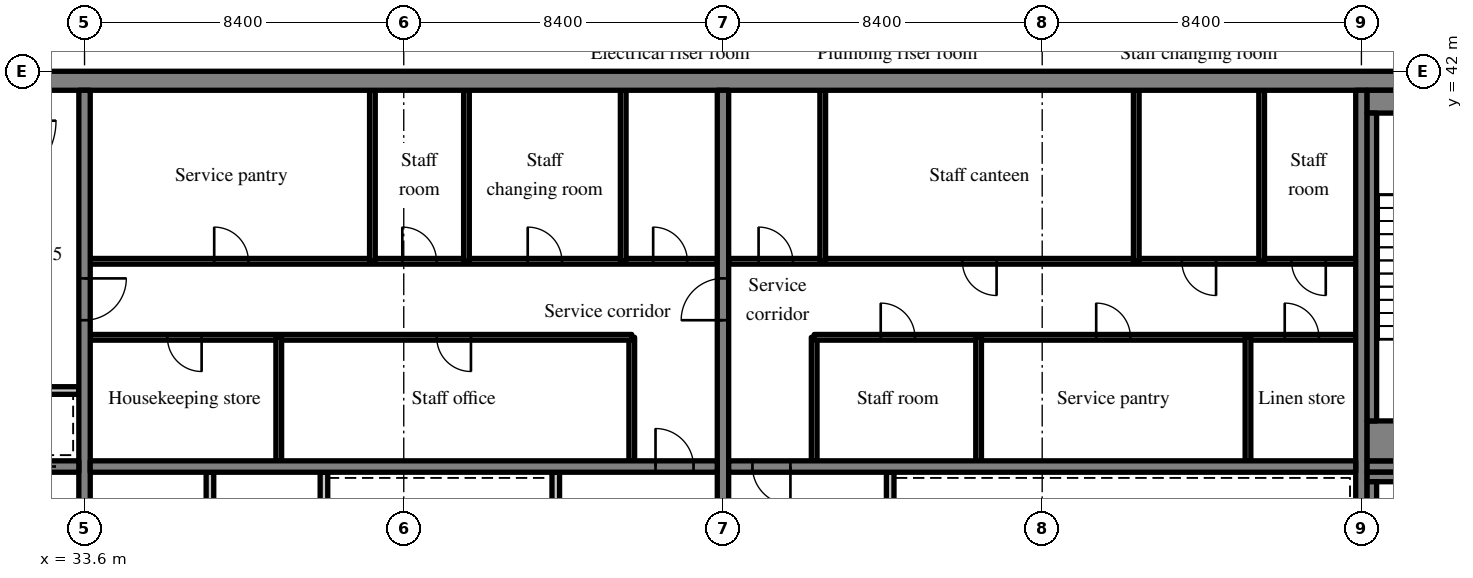
"""IFC4 building model, lengths in metres.
Left out: names, types, materials, properties, quantities, classifications, styles, units other than length and angle.
Written with IfcOpenShell. Run it as: python <this file> out.ifc"""

import sys

from ifc_helpers import new_model, si_unit, direction, frame, frame_2d, origin, place, context, subcontext, project, spatial, rectangle, extrude, source, transform, mapped, element, fill, save


model = new_model("IFC4")
c1 = context("Model", 3, precision=1e-05, world=origin(), true_north=direction((0.0, 1.0)))
c2 = subcontext(c1, "Body", "Model", "MODEL_VIEW")
j1 = project(units=[si_unit("LENGTHUNIT", "METRE"), si_unit("PLANEANGLEUNIT", "RADIAN")], contexts=[c1])
p1 = place(None, origin())
s1 = spatial("IfcSite", under=j1, at=p1, CompositionType="ELEMENT")
p2 = place(p1, origin())
s2 = spatial("IfcBuilding", under=s1, at=p2, CompositionType="ELEMENT")
p3 = place(p2, frame((0.0, 0.0, 293.7)))
s3 = spatial("IfcBuildingStorey", under=s2, at=p3, CompositionType="ELEMENT", Elevation=293.7)
m1 = source(origin(), c2, "Body", "SweptSolid", [
    extrude(rectangle(XDim=50.4, YDim=0.5, at=frame_2d((25.2, 0.0))), origin(), (0.0, 0.0, 1.0), 3.72),
])
p4 = place(p3, frame((25.2, 41.75, 0.0), z_axis=(0.0, 0.0, 1.0), x_axis=(1.0, 0.0, 0.0)))
e1 = element("IfcWall", 1, at=p4, inside=s3, PredefinedType="SHEAR", context=c2, shape_type="MappedRepresentation", body=[
    mapped(m1, transform((0.0, 0.0, 0.0), scale=1.0)),
])
m2 = source(origin(), c2, "Body", "SweptSolid", [
    extrude(rectangle(XDim=19.0, YDim=0.3, at=frame_2d((9.5, 0.0))), origin(), (0.0, 0.0, 1.0), 3.72),
])
p5 = place(p3, frame((33.6, 22.5, 0.0), z_axis=(0.0, 0.0, 1.0), x_axis=(0.0, 1.0, 0.0)))
e2 = element("IfcWall", 2, at=p5, inside=s3, PredefinedType="SHEAR", context=c2, shape_type="MappedRepresentation", body=[
    mapped(m2, transform((0.0, 0.0, 0.0), scale=1.0)),
])
m3 = source(origin(), c2, "Body", "SweptSolid", [
    extrude(rectangle(XDim=1.1, YDim=2.1, at=frame_2d((0.55, 1.05))), frame((0.0, 0.16, 0.0), z_axis=(0.0, -1.0, 0.0), x_axis=(1.0, 0.0, 0.0)), (0.0, 0.0, 1.0), 0.32),
])
p6 = place(p5, frame((12.95, 0.0, 0.0)))
e3 = element("IfcOpeningElement", 3, at=p6, cuts=e2, PredefinedType="OPENING", context=c2, shape_type="MappedRepresentation", body=[
    mapped(m3, transform((0.0, 0.0, 0.0), scale=1.0)),
])
p7 = place(p3, frame((50.4, 22.5, 0.0), z_axis=(0.0, 0.0, 1.0), x_axis=(0.0, 1.0, 0.0)))
e4 = element("IfcWall", 4, at=p7, inside=s3, PredefinedType="SHEAR", context=c2, shape_type="MappedRepresentation", body=[
    mapped(m2, transform((0.0, 0.0, 0.0), scale=1.0)),
])
p8 = place(p7, frame((12.95, 0.0, 0.0)))
e5 = element("IfcOpeningElement", 5, at=p8, cuts=e4, PredefinedType="OPENING", context=c2, shape_type="MappedRepresentation", body=[
    mapped(m3, transform((0.0, 0.0, 0.0), scale=1.0)),
])
p9 = place(p3, frame((67.2, 22.5, 0.0), z_axis=(0.0, 0.0, 1.0), x_axis=(0.0, 1.0, 0.0)))
e6 = element("IfcWall", 6, at=p9, inside=s3, PredefinedType="SHEAR", context=c2, shape_type="MappedRepresentation", body=[
    mapped(m2, transform((0.0, 0.0, 0.0), scale=1.0)),
])
m4 = source(origin(), c2, "Body", "SweptSolid", [
    extrude(rectangle(XDim=7.75, YDim=0.3, at=frame_2d((3.875, 0.0))), origin(), (0.0, 0.0, 1.0), 3.72),
])
p10 = place(p3, frame((25.7, 31.6, 0.0), z_axis=(0.0, 0.0, 1.0), x_axis=(1.0, 0.0, 0.0)))
e7 = element("IfcWall", 7, at=p10, inside=s3, PredefinedType="SHEAR", context=c2, shape_type="MappedRepresentation", body=[
    mapped(m4, transform((0.0, 0.0, 0.0), scale=1.0)),
])
p11 = place(p10, frame((6.05, 0.0, 0.0)))
e8 = element("IfcOpeningElement", 8, at=p11, cuts=e7, PredefinedType="OPENING", context=c2, shape_type="MappedRepresentation", body=[
    mapped(m3, transform((0.0, 0.0, 0.0), scale=1.0)),
])
m5 = source(origin(), c2, "Body", "SweptSolid", [
    extrude(rectangle(XDim=16.5, YDim=0.3, at=frame_2d((8.25, 0.0))), origin(), (0.0, 0.0, 1.0), 3.72),
])
p12 = place(p3, frame((33.75, 31.6, 0.0), z_axis=(0.0, 0.0, 1.0), x_axis=(1.0, 0.0, 0.0)))
e9 = element("IfcWall", 9, at=p12, inside=s3, PredefinedType="SHEAR", context=c2, shape_type="MappedRepresentation", body=[
    mapped(m5, transform((0.0, 0.0, 0.0), scale=1.0)),
])
m6 = source(origin(), c2, "Body", "SweptSolid", [
    extrude(rectangle(XDim=1.0, YDim=2.1, at=frame_2d((0.5, 1.05))), frame((0.0, 0.16, 0.0), z_axis=(0.0, -1.0, 0.0), x_axis=(1.0, 0.0, 0.0)), (0.0, 0.0, 1.0), 0.32),
])
p13 = place(p12, frame((14.875, 0.0, 0.0)))
e10 = element("IfcOpeningElement", 10, at=p13, cuts=e9, PredefinedType="OPENING", context=c2, shape_type="MappedRepresentation", body=[
    mapped(m6, transform((0.0, 0.0, 0.0), scale=1.0)),
])
p14 = place(p3, frame((50.55, 31.6, 0.0), z_axis=(0.0, 0.0, 1.0), x_axis=(1.0, 0.0, 0.0)))
e11 = element("IfcWall", 11, at=p14, inside=s3, PredefinedType="SHEAR", context=c2, shape_type="MappedRepresentation", body=[
    mapped(m5, transform((0.0, 0.0, 0.0), scale=1.0)),
])
p15 = place(p14, frame((0.625, 0.0, 0.0)))
e12 = element("IfcOpeningElement", 12, at=p15, cuts=e11, PredefinedType="OPENING", context=c2, shape_type="MappedRepresentation", body=[
    mapped(m6, transform((0.0, 0.0, 0.0), scale=1.0)),
])
p16 = place(p3, frame((67.35, 31.6, 0.0), z_axis=(0.0, 0.0, 1.0), x_axis=(1.0, 0.0, 0.0)))
e13 = element("IfcWall", 13, at=p16, inside=s3, PredefinedType="SHEAR", context=c2, shape_type="MappedRepresentation", body=[
    mapped(m4, transform((0.0, 0.0, 0.0), scale=1.0)),
])
p17 = place(p16, frame((5.875, 0.0, 0.0)))
e14 = element("IfcOpeningElement", 14, at=p17, cuts=e13, PredefinedType="OPENING", context=c2, shape_type="MappedRepresentation", body=[
    mapped(m3, transform((0.0, 0.0, 0.0), scale=1.0)),
])
m7 = source(origin(), c2, "Body", "SweptSolid", [
    extrude(rectangle(XDim=8.95, YDim=0.2, at=frame_2d((4.475, 0.0))), origin(), (0.0, 0.0, 1.0), 3.72),
])
p18 = place(p3, frame((39.9, 22.5, 0.0), z_axis=(0.0, 0.0, 1.0), x_axis=(0.0, 1.0, 0.0)))
e15 = element("IfcWall", 15, at=p18, inside=s3, PredefinedType="PARTITIONING", context=c2, shape_type="MappedRepresentation", body=[
    mapped(m7, transform((0.0, 0.0, 0.0), scale=1.0)),
])
m8 = source(origin(), c2, "Body", "SweptSolid", [
    extrude(rectangle(XDim=0.9, YDim=2.1, at=frame_2d((0.45, 1.05))), frame((0.0, 0.11, 0.0), z_axis=(0.0, -1.0, 0.0), x_axis=(1.0, 0.0, 0.0)), (0.0, 0.0, 1.0), 0.22),
])
p19 = place(p18, frame((4.05, 0.0, 0.0)))
e16 = element("IfcOpeningElement", 16, at=p19, cuts=e15, PredefinedType="OPENING", context=c2, shape_type="MappedRepresentation", body=[
    mapped(m8, transform((0.0, 0.0, 0.0), scale=1.0)),
])
m9 = source(origin(), c2, "Body", "SweptSolid", [
    extrude(rectangle(XDim=2.65, YDim=0.2, at=frame_2d((1.325, 0.0))), origin(), (0.0, 0.0, 1.0), 3.72),
])
p20 = place(p3, frame((46.0, 28.8, 0.0), z_axis=(0.0, 0.0, 1.0), x_axis=(0.0, 1.0, 0.0)))
e17 = element("IfcWall", 17, at=p20, inside=s3, PredefinedType="SOLIDWALL", context=c2, shape_type="MappedRepresentation", body=[
    mapped(m9, transform((0.0, 0.0, 0.0), scale=1.0)),
])
p21 = place(p3, frame((36.9, 22.5, 0.0), z_axis=(0.0, 0.0, 1.0), x_axis=(0.0, 1.0, 0.0)))
e18 = element("IfcWall", 18, at=p21, inside=s3, PredefinedType="PARTITIONING", context=c2, shape_type="MappedRepresentation", body=[
    mapped(m7, transform((0.0, 0.0, 0.0), scale=1.0)),
])
m10 = source(origin(), c2, "Body", "SweptSolid", [
    extrude(rectangle(XDim=3.25, YDim=0.15, at=frame_2d((1.625, 0.0))), origin(), (0.0, 0.0, 1.0), 3.72),
])
p22 = place(p3, frame((48.0, 31.75, 0.0), z_axis=(0.0, 0.0, 1.0), x_axis=(0.0, 1.0, 0.0)))
e19 = element("IfcWall", 19, at=p22, inside=s3, PredefinedType="PARTITIONING", context=c2, shape_type="MappedRepresentation", body=[
    mapped(m10, transform((0.0, 0.0, 0.0), scale=1.0)),
])
m11 = source(origin(), c2, "Body", "SweptSolid", [
    extrude(rectangle(XDim=14.25, YDim=0.15, at=frame_2d((7.125, 0.0))), origin(), (0.0, 0.0, 1.0), 3.72),
])
p23 = place(p3, frame((33.75, 35.0, 0.0), z_axis=(0.0, 0.0, 1.0), x_axis=(1.0, 0.0, 0.0)))
e20 = element("IfcWall", 20, at=p23, inside=s3, PredefinedType="PARTITIONING", context=c2, shape_type="MappedRepresentation", body=[
    mapped(m11, transform((0.0, 0.0, 0.0), scale=1.0)),
])
m12 = source(origin(), c2, "Body", "SweptSolid", [
    extrude(rectangle(XDim=0.9, YDim=2.1, at=frame_2d((0.45, 1.05))), frame((0.0, 0.085, 0.0), z_axis=(0.0, -1.0, 0.0), x_axis=(1.0, 0.0, 0.0)), (0.0, 0.0, 1.0), 0.17),
])
p24 = place(p23, frame((2.031, 0.0, 0.0)))
e21 = element("IfcOpeningElement", 21, at=p24, cuts=e20, PredefinedType="OPENING", context=c2, shape_type="MappedRepresentation", body=[
    mapped(m12, transform((0.0, 0.0, 0.0), scale=1.0)),
])
p25 = place(p23, frame((9.118, 0.0, 0.0)))
e22 = element("IfcOpeningElement", 22, at=p25, cuts=e20, PredefinedType="OPENING", context=c2, shape_type="MappedRepresentation", body=[
    mapped(m12, transform((0.0, 0.0, 0.0), scale=1.0)),
])
m13 = source(origin(), c2, "Body", "SweptSolid", [
    extrude(rectangle(XDim=16.5, YDim=0.15, at=frame_2d((8.25, 0.0))), origin(), (0.0, 0.0, 1.0), 3.72),
])
p26 = place(p3, frame((33.75, 37.0, 0.0), z_axis=(0.0, 0.0, 1.0), x_axis=(1.0, 0.0, 0.0)))
e23 = element("IfcWall", 23, at=p26, inside=s3, PredefinedType="PARTITIONING", context=c2, shape_type="MappedRepresentation", body=[
    mapped(m13, transform((0.0, 0.0, 0.0), scale=1.0)),
])
p27 = place(p26, frame((3.262, 0.0, 0.0)))
e24 = element("IfcOpeningElement", 24, at=p27, cuts=e23, PredefinedType="OPENING", context=c2, shape_type="MappedRepresentation", body=[
    mapped(m12, transform((0.0, 0.0, 0.0), scale=1.0)),
])
p28 = place(p26, frame((8.212, 0.0, 0.0)))
e25 = element("IfcOpeningElement", 25, at=p28, cuts=e23, PredefinedType="OPENING", context=c2, shape_type="MappedRepresentation", body=[
    mapped(m12, transform((0.0, 0.0, 0.0), scale=1.0)),
])
p29 = place(p26, frame((11.512, 0.0, 0.0)))
e26 = element("IfcOpeningElement", 26, at=p29, cuts=e23, PredefinedType="OPENING", context=c2, shape_type="MappedRepresentation", body=[
    mapped(m12, transform((0.0, 0.0, 0.0), scale=1.0)),
])
p30 = place(p26, frame((14.813, 0.0, 0.0)))
e27 = element("IfcOpeningElement", 27, at=p30, cuts=e23, PredefinedType="OPENING", context=c2, shape_type="MappedRepresentation", body=[
    mapped(m12, transform((0.0, 0.0, 0.0), scale=1.0)),
])
p31 = place(p3, frame((38.711, 31.75, 0.0), z_axis=(0.0, 0.0, 1.0), x_axis=(0.0, 1.0, 0.0)))
e28 = element("IfcWall", 28, at=p31, inside=s3, PredefinedType="PARTITIONING", context=c2, shape_type="MappedRepresentation", body=[
    mapped(m10, transform((0.0, 0.0, 0.0), scale=1.0)),
])
m14 = source(origin(), c2, "Body", "SweptSolid", [
    extrude(rectangle(XDim=4.5, YDim=0.15, at=frame_2d((2.25, 0.0))), origin(), (0.0, 0.0, 1.0), 3.72),
])
for number, where, z_axis, x_axis in (
    (29, (41.175, 37.0, 0.0), (0.0, 0.0, 1.0), (0.0, 1.0, 0.0)),
    (30, (43.65, 37.0, 0.0), (0.0, 0.0, 1.0), (0.0, 1.0, 0.0)),
    (31, (47.775, 37.0, 0.0), (0.0, 0.0, 1.0), (0.0, 1.0, 0.0)),
):
    element("IfcWall", number, at=place(p3, frame(where, z_axis=z_axis, x_axis=x_axis)), inside=s3, PredefinedType="PARTITIONING", context=c2, shape_type="MappedRepresentation", body=[
        mapped(m14, transform((0.0, 0.0, 0.0), scale=1.0)),
    ])
p32 = place(p3, frame((54.8, 28.8, 0.0), z_axis=(0.0, 0.0, 1.0), x_axis=(0.0, 1.0, 0.0)))
e32 = element("IfcWall", 32, at=p32, inside=s3, PredefinedType="SOLIDWALL", context=c2, shape_type="MappedRepresentation", body=[
    mapped(m9, transform((0.0, 0.0, 0.0), scale=1.0)),
])
p33 = place(p3, frame((52.8, 31.75, 0.0), z_axis=(0.0, 0.0, 1.0), x_axis=(0.0, 1.0, 0.0)))
e33 = element("IfcWall", 33, at=p33, inside=s3, PredefinedType="PARTITIONING", context=c2, shape_type="MappedRepresentation", body=[
    mapped(m10, transform((0.0, 0.0, 0.0), scale=1.0)),
])
p34 = place(p3, frame((67.05, 35.0, 0.0), z_axis=(0.0, 0.0, 1.0), x_axis=(-1.0, 0.0, 0.0)))
e34 = element("IfcWall", 34, at=p34, inside=s3, PredefinedType="PARTITIONING", context=c2, shape_type="MappedRepresentation", body=[
    mapped(m11, transform((0.0, 0.0, 0.0), scale=1.0)),
])
p35 = place(p34, frame((0.968, 0.0, 0.0)))
e35 = element("IfcOpeningElement", 35, at=p35, cuts=e34, PredefinedType="OPENING", context=c2, shape_type="MappedRepresentation", body=[
    mapped(m12, transform((0.0, 0.0, 0.0), scale=1.0)),
])
p36 = place(p34, frame((5.929, 0.0, 0.0)))
e36 = element("IfcOpeningElement", 36, at=p36, cuts=e34, PredefinedType="OPENING", context=c2, shape_type="MappedRepresentation", body=[
    mapped(m12, transform((0.0, 0.0, 0.0), scale=1.0)),
])
p37 = place(p34, frame((11.599, 0.0, 0.0)))
e37 = element("IfcOpeningElement", 37, at=p37, cuts=e34, PredefinedType="OPENING", context=c2, shape_type="MappedRepresentation", body=[
    mapped(m12, transform((0.0, 0.0, 0.0), scale=1.0)),
])
p38 = place(p3, frame((67.05, 37.0, 0.0), z_axis=(0.0, 0.0, 1.0), x_axis=(-1.0, 0.0, 0.0)))
e38 = element("IfcWall", 38, at=p38, inside=s3, PredefinedType="PARTITIONING", context=c2, shape_type="MappedRepresentation", body=[
    mapped(m13, transform((0.0, 0.0, 0.0), scale=1.0)),
])
p39 = place(p38, frame((0.788, 0.0, 0.0)))
e39 = element("IfcOpeningElement", 39, at=p39, cuts=e38, PredefinedType="OPENING", context=c2, shape_type="MappedRepresentation", body=[
    mapped(m12, transform((0.0, 0.0, 0.0), scale=1.0)),
])
p40 = place(p38, frame((3.675, 0.0, 0.0)))
e40 = element("IfcOpeningElement", 40, at=p40, cuts=e38, PredefinedType="OPENING", context=c2, shape_type="MappedRepresentation", body=[
    mapped(m12, transform((0.0, 0.0, 0.0), scale=1.0)),
])
p41 = place(p38, frame((9.45, 0.0, 0.0)))
e41 = element("IfcOpeningElement", 41, at=p41, cuts=e38, PredefinedType="OPENING", context=c2, shape_type="MappedRepresentation", body=[
    mapped(m12, transform((0.0, 0.0, 0.0), scale=1.0)),
])
p42 = place(p38, frame((14.813, 0.0, 0.0)))
e42 = element("IfcOpeningElement", 42, at=p42, cuts=e38, PredefinedType="OPENING", context=c2, shape_type="MappedRepresentation", body=[
    mapped(m12, transform((0.0, 0.0, 0.0), scale=1.0)),
])
for number, where, z_axis, x_axis in (
    (43, (64.215, 31.75, 0.0), (0.0, 0.0, 1.0), (0.0, 1.0, 0.0)),
    (44, (57.127, 31.75, 0.0), (0.0, 0.0, 1.0), (0.0, 1.0, 0.0)),
):
    element("IfcWall", number, at=place(p3, frame(where, z_axis=z_axis, x_axis=x_axis)), inside=s3, PredefinedType="PARTITIONING", context=c2, shape_type="MappedRepresentation", body=[
        mapped(m10, transform((0.0, 0.0, 0.0), scale=1.0)),
    ])
for number, where, z_axis, x_axis in (
    (45, (64.575, 37.0, 0.0), (0.0, 0.0, 1.0), (0.0, 1.0, 0.0)),
    (46, (61.275, 37.0, 0.0), (0.0, 0.0, 1.0), (0.0, 1.0, 0.0)),
    (47, (53.025, 37.0, 0.0), (0.0, 0.0, 1.0), (0.0, 1.0, 0.0)),
):
    element("IfcWall", number, at=place(p3, frame(where, z_axis=z_axis, x_axis=x_axis)), inside=s3, PredefinedType="PARTITIONING", context=c2, shape_type="MappedRepresentation", body=[
        mapped(m14, transform((0.0, 0.0, 0.0), scale=1.0)),
    ])
m15 = source(origin(), c2, "Body", "SweptSolid", [
    extrude(rectangle(XDim=2.3, YDim=0.2, at=frame_2d((1.15, 0.0))), origin(), (0.0, 0.0, 1.0), 3.72),
])
p43 = place(p3, frame((31.15, 33.6, 0.0), z_axis=(0.0, 0.0, 1.0), x_axis=(1.0, 0.0, 0.0)))
e48 = element("IfcWall", 48, at=p43, inside=s3, PredefinedType="SOLIDWALL", context=c2, shape_type="MappedRepresentation", body=[
    mapped(m15, transform((0.0, 0.0, 0.0), scale=1.0)),
])
m16 = source(origin(), c2, "Body", "SweptSolid", [
    extrude(rectangle(XDim=4.9, YDim=0.25, at=frame_2d((2.45, 0.0))), origin(), (0.0, 0.0, 1.0), 3.72),
])
p44 = place(p3, frame((67.35, 31.325, 0.0), z_axis=(0.0, 0.0, 1.0), x_axis=(1.0, 0.0, 0.0)))
e49 = element("IfcWall", 49, at=p44, inside=s3, PredefinedType="SOLIDWALL", context=c2, shape_type="MappedRepresentation", body=[
    mapped(m16, transform((0.0, 0.0, 0.0), scale=1.0)),
])
m17 = source(origin(), c2, "Body", "SweptSolid", [
    extrude(rectangle(XDim=8.1, YDim=0.25, at=frame_2d((4.05, 0.0))), origin(), (0.0, 0.0, 1.0), 3.72),
])
p45 = place(p3, frame((67.475, 23.1, 0.0), z_axis=(0.0, 0.0, 1.0), x_axis=(0.0, 1.0, 0.0)))
e50 = element("IfcWall", 50, at=p45, inside=s3, PredefinedType="SOLIDWALL", context=c2, shape_type="MappedRepresentation", body=[
    mapped(m17, transform((0.0, 0.0, 0.0), scale=1.0)),
])
m18 = source(origin(), c2, "Body", "SweptSolid", [
    extrude(rectangle(XDim=4.9, YDim=0.6, at=frame_2d((2.45, 0.0))), origin(), (0.0, 0.0, 1.0), 3.72),
])
p46 = place(p3, frame((67.35, 41.2, 0.0), z_axis=(0.0, 0.0, 1.0), x_axis=(1.0, 0.0, 0.0)))
e51 = element("IfcWall", 51, at=p46, inside=s3, PredefinedType="SOLIDWALL", context=c2, shape_type="MappedRepresentation", body=[
    mapped(m18, transform((0.0, 0.0, 0.0), scale=1.0)),
])
m19 = source(origin(), c2, "Body", "SweptSolid", [
    extrude(rectangle(XDim=4.9, YDim=1.05, at=frame_2d((2.45, 0.0))), origin(), (0.0, 0.0, 1.0), 3.72),
])
p47 = place(p3, frame((67.35, 32.275, 0.0), z_axis=(0.0, 0.0, 1.0), x_axis=(1.0, 0.0, 0.0)))
e52 = element("IfcWall", 52, at=p47, inside=s3, PredefinedType="SOLIDWALL", context=c2, shape_type="MappedRepresentation", body=[
    mapped(m19, transform((0.0, 0.0, 0.0), scale=1.0)),
])
p48 = place(p3, frame((67.475, 32.8, 0.0), z_axis=(0.0, 0.0, 1.0), x_axis=(0.0, 1.0, 0.0)))
e53 = element("IfcWall", 53, at=p48, inside=s3, PredefinedType="SOLIDWALL", context=c2, shape_type="MappedRepresentation", body=[
    mapped(m17, transform((0.0, 0.0, 0.0), scale=1.0)),
])
m20 = source(origin(), c2, "Body", "SweptSolid", [
    extrude(rectangle(XDim=1.0, YDim=2.1, at=frame_2d((0.5, 1.05))), frame((0.0, 0.025, 0.0), z_axis=(0.0, -1.0, 0.0), x_axis=(1.0, 0.0, 0.0)), (0.0, 0.0, 1.0), 0.05),
])
p49 = place(p13, origin())
e54 = element("IfcDoor", 54, at=p49, inside=s3, OperationType="SINGLE_SWING_LEFT", PredefinedType="DOOR", context=c2, shape_type="MappedRepresentation", body=[
    mapped(m20, transform((0.0, 0.0, 0.0), scale=1.0)),
])
fill(e10, e54)
m21 = source(origin(), c2, "Body", "SweptSolid", [
    extrude(rectangle(XDim=0.9, YDim=2.1, at=frame_2d((0.45, 1.05))), frame((0.0, 0.025, 0.0), z_axis=(0.0, -1.0, 0.0), x_axis=(1.0, 0.0, 0.0)), (0.0, 0.0, 1.0), 0.05),
])
p50 = place(p24, origin())
e55 = element("IfcDoor", 55, at=p50, inside=s3, OperationType="SINGLE_SWING_RIGHT", PredefinedType="DOOR", context=c2, shape_type="MappedRepresentation", body=[
    mapped(m21, transform((0.0, 0.0, 0.0), scale=1.0)),
])
fill(e21, e55)
p51 = place(p25, origin())
e56 = element("IfcDoor", 56, at=p51, inside=s3, OperationType="SINGLE_SWING_RIGHT", PredefinedType="DOOR", context=c2, shape_type="MappedRepresentation", body=[
    mapped(m21, transform((0.0, 0.0, 0.0), scale=1.0)),
])
fill(e22, e56)
p52 = place(p27, origin())
e57 = element("IfcDoor", 57, at=p52, inside=s3, OperationType="SINGLE_SWING_LEFT", PredefinedType="DOOR", context=c2, shape_type="MappedRepresentation", body=[
    mapped(m21, transform((0.0, 0.0, 0.0), scale=1.0)),
])
fill(e24, e57)
p53 = place(p28, origin())
e58 = element("IfcDoor", 58, at=p53, inside=s3, OperationType="SINGLE_SWING_LEFT", PredefinedType="DOOR", context=c2, shape_type="MappedRepresentation", body=[
    mapped(m21, transform((0.0, 0.0, 0.0), scale=1.0)),
])
fill(e25, e58)
p54 = place(p29, origin())
e59 = element("IfcDoor", 59, at=p54, inside=s3, OperationType="SINGLE_SWING_LEFT", PredefinedType="DOOR", context=c2, shape_type="MappedRepresentation", body=[
    mapped(m21, transform((0.0, 0.0, 0.0), scale=1.0)),
])
fill(e26, e59)
p55 = place(p30, origin())
e60 = element("IfcDoor", 60, at=p55, inside=s3, OperationType="SINGLE_SWING_LEFT", PredefinedType="DOOR", context=c2, shape_type="MappedRepresentation", body=[
    mapped(m21, transform((0.0, 0.0, 0.0), scale=1.0)),
])
fill(e27, e60)
p56 = place(p15, origin())
e61 = element("IfcDoor", 61, at=p56, inside=s3, OperationType="SINGLE_SWING_RIGHT", PredefinedType="DOOR", context=c2, shape_type="MappedRepresentation", body=[
    mapped(m20, transform((0.0, 0.0, 0.0), scale=1.0)),
])
fill(e12, e61)
p57 = place(p35, origin())
e62 = element("IfcDoor", 62, at=p57, inside=s3, OperationType="SINGLE_SWING_RIGHT", PredefinedType="DOOR", context=c2, shape_type="MappedRepresentation", body=[
    mapped(m21, transform((0.0, 0.0, 0.0), scale=1.0)),
])
fill(e35, e62)
p58 = place(p36, origin())
e63 = element("IfcDoor", 63, at=p58, inside=s3, OperationType="SINGLE_SWING_RIGHT", PredefinedType="DOOR", context=c2, shape_type="MappedRepresentation", body=[
    mapped(m21, transform((0.0, 0.0, 0.0), scale=1.0)),
])
fill(e36, e63)
p59 = place(p37, origin())
e64 = element("IfcDoor", 64, at=p59, inside=s3, OperationType="SINGLE_SWING_RIGHT", PredefinedType="DOOR", context=c2, shape_type="MappedRepresentation", body=[
    mapped(m21, transform((0.0, 0.0, 0.0), scale=1.0)),
])
fill(e37, e64)
p60 = place(p39, origin())
e65 = element("IfcDoor", 65, at=p60, inside=s3, OperationType="SINGLE_SWING_LEFT", PredefinedType="DOOR", context=c2, shape_type="MappedRepresentation", body=[
    mapped(m21, transform((0.0, 0.0, 0.0), scale=1.0)),
])
fill(e39, e65)
p61 = place(p40, origin())
e66 = element("IfcDoor", 66, at=p61, inside=s3, OperationType="SINGLE_SWING_LEFT", PredefinedType="DOOR", context=c2, shape_type="MappedRepresentation", body=[
    mapped(m21, transform((0.0, 0.0, 0.0), scale=1.0)),
])
fill(e40, e66)
p62 = place(p41, origin())
e67 = element("IfcDoor", 67, at=p62, inside=s3, OperationType="SINGLE_SWING_LEFT", PredefinedType="DOOR", context=c2, shape_type="MappedRepresentation", body=[
    mapped(m21, transform((0.0, 0.0, 0.0), scale=1.0)),
])
fill(e41, e67)
p63 = place(p42, origin())
e68 = element("IfcDoor", 68, at=p63, inside=s3, OperationType="SINGLE_SWING_RIGHT", PredefinedType="DOOR", context=c2, shape_type="MappedRepresentation", body=[
    mapped(m21, transform((0.0, 0.0, 0.0), scale=1.0)),
])
fill(e42, e68)
m22 = source(origin(), c2, "Body", "SweptSolid", [
    extrude(rectangle(XDim=1.1, YDim=2.1, at=frame_2d((0.55, 1.05))), frame((0.0, 0.025, 0.0), z_axis=(0.0, -1.0, 0.0), x_axis=(1.0, 0.0, 0.0)), (0.0, 0.0, 1.0), 0.05),
])
p64 = place(p11, origin())
e69 = element("IfcDoor", 69, at=p64, inside=s3, OperationType="SLIDING_TO_LEFT", PredefinedType="DOOR", context=c2, shape_type="MappedRepresentation", body=[
    mapped(m22, transform((0.0, 0.0, 0.0), scale=1.0)),
])
fill(e8, e69)
p65 = place(p6, origin())
e70 = element("IfcDoor", 70, at=p65, inside=s3, OperationType="SINGLE_SWING_RIGHT", PredefinedType="DOOR", context=c2, shape_type="MappedRepresentation", body=[
    mapped(m22, transform((0.0, 0.0, 0.0), scale=1.0)),
])
fill(e3, e70)
p66 = place(p8, origin())
e71 = element("IfcDoor", 71, at=p66, inside=s3, OperationType="SINGLE_SWING_LEFT", PredefinedType="DOOR", context=c2, shape_type="MappedRepresentation", body=[
    mapped(m22, transform((0.0, 0.0, 0.0), scale=1.0)),
])
fill(e5, e71)
save(model, sys.argv[1])
